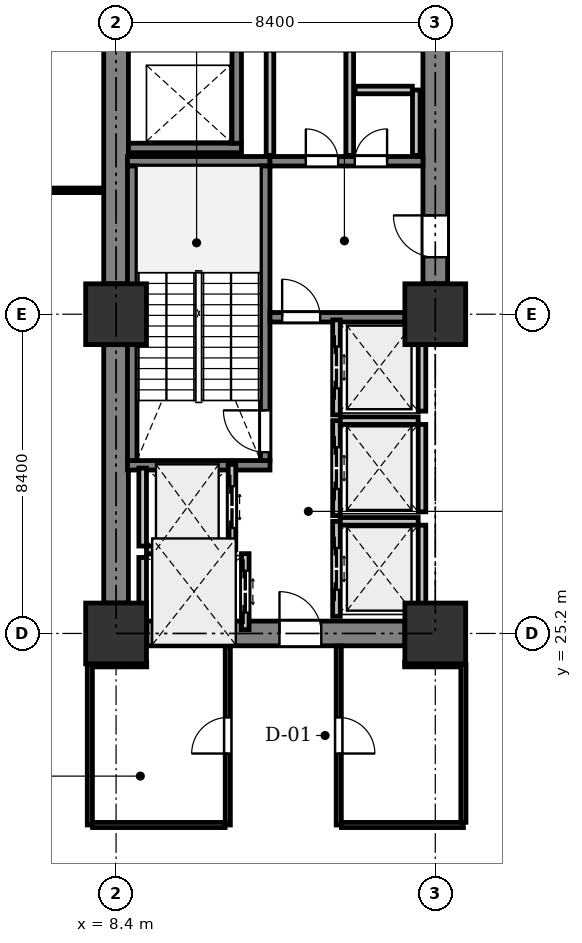
"""IFC4 building model, lengths in metres.
Left out: names, types, materials, properties, quantities, classifications, styles, units other than length and angle.
Written with IfcOpenShell. Run it as: python <this file> out.ifc"""

import sys

from ifc_helpers import new_model, si_unit, direction, frame, frame_2d, origin, origin_2d, place, context, subcontext, project, spatial, rectangle, extrude, element, fill, save


model = new_model("IFC4")
c1 = context("Model", 3, precision=1e-05, world=origin(), true_north=direction((0.0, 1.0)))
c2 = subcontext(c1, "Body", "Model", "MODEL_VIEW")
j1 = project(units=[si_unit("LENGTHUNIT", "METRE"), si_unit("PLANEANGLEUNIT", "RADIAN")], contexts=[c1])
p1 = place(None, origin())
s1 = spatial("IfcSite", under=j1, at=p1, CompositionType="ELEMENT")
p2 = place(p1, origin())
s2 = spatial("IfcBuilding", under=s1, at=p2, CompositionType="ELEMENT")
p3 = place(p2, frame((0.0, 0.0, 15.0)))
s3 = spatial("IfcBuildingStorey", under=s2, at=p3, CompositionType="ELEMENT", Elevation=15.0)
for number, where, z_axis, x_axis in (
    (1, (8.4, 25.2, 0.0), (0.0, 0.0, 1.0), (1.0, 0.0, 0.0)),
    (2, (8.4, 33.6, 0.0), (0.0, 0.0, 1.0), (1.0, 0.0, 0.0)),
    (3, (16.8, 25.2, 0.0), (0.0, 0.0, 1.0), (1.0, 0.0, 0.0)),
    (4, (16.8, 33.6, 0.0), (0.0, 0.0, 1.0), (1.0, 0.0, 0.0)),
):
    element("IfcColumn", number, at=place(p3, frame(where, z_axis=z_axis, x_axis=x_axis)), inside=s3, PredefinedType="COLUMN", context=c2, shape_type="SweptSolid", body=[
        extrude(rectangle(XDim=1.6, YDim=1.6, at=origin_2d()), origin(), (0.0, 0.0, 1.0), 4.8),
    ])
for number, where, z_axis, x_axis in (
    (5, (8.4, 26.0, 0.0), (0.0, 0.0, 1.0), (0.0, 1.0, 0.0)),
    (6, (8.4, 34.4, 0.0), (0.0, 0.0, 1.0), (0.0, 1.0, 0.0)),
):
    element("IfcWall", number, at=place(p3, frame(where, z_axis=z_axis, x_axis=x_axis)), inside=s3, PredefinedType="SHEAR", context=c2, shape_type="SweptSolid", body=[
        extrude(rectangle(XDim=6.8, YDim=0.65, at=frame_2d((3.4, 0.0))), origin(), (0.0, 0.0, 1.0), 4.45),
    ])
p4 = place(p3, frame((16.8, 34.4, 0.0), z_axis=(0.0, 0.0, 1.0), x_axis=(0.0, 1.0, 0.0)))
e7 = element("IfcWall", 7, at=p4, inside=s3, PredefinedType="SHEAR", context=c2, shape_type="SweptSolid", body=[
    extrude(rectangle(XDim=6.8, YDim=0.65, at=frame_2d((3.4, 0.0))), origin(), (0.0, 0.0, 1.0), 4.45),
])
p5 = place(p4, frame((0.7, 0.0, 0.0)))
e8 = element("IfcOpeningElement", 8, at=p5, cuts=e7, PredefinedType="OPENING", context=c2, shape_type="SweptSolid", body=[
    extrude(rectangle(XDim=1.1, YDim=2.15, at=frame_2d((0.55, 1.075))), frame((0.0, 0.335, 0.0), z_axis=(0.0, -1.0, 0.0), x_axis=(1.0, 0.0, 0.0)), (0.0, 0.0, 1.0), 0.67),
])
p6 = place(p3, frame((9.2, 25.2, 0.0), z_axis=(0.0, 0.0, 1.0), x_axis=(1.0, 0.0, 0.0)))
e9 = element("IfcWall", 9, at=p6, inside=s3, PredefinedType="SHEAR", context=c2, shape_type="SweptSolid", body=[
    extrude(rectangle(XDim=6.8, YDim=0.65, at=frame_2d((3.4, 0.0))), origin(), (0.0, 0.0, 1.0), 4.45),
])
p7 = place(p6, frame((3.5, 0.0, 0.0)))
e10 = element("IfcOpeningElement", 10, at=p7, cuts=e9, PredefinedType="OPENING", context=c2, shape_type="SweptSolid", body=[
    extrude(rectangle(XDim=1.1, YDim=2.15, at=frame_2d((0.55, 1.075))), frame((0.0, 0.335, 0.0), z_axis=(0.0, -1.0, 0.0), x_axis=(1.0, 0.0, 0.0)), (0.0, 0.0, 1.0), 0.67),
])
for number, where, z_axis, x_axis in (
    (11, (12.45, 29.625, 0.0), (0.0, 0.0, 1.0), (-1.0, 0.0, 0.0)),
    (12, (12.45, 37.625, 0.0), (0.0, 0.0, 1.0), (-1.0, 0.0, 0.0)),
):
    element("IfcWall", number, at=place(p3, frame(where, z_axis=z_axis, x_axis=x_axis)), inside=s3, PredefinedType="SHEAR", context=c2, shape_type="SweptSolid", body=[
        extrude(rectangle(XDim=3.75, YDim=0.25, at=frame_2d((1.875, 0.0))), origin(), (0.0, 0.0, 1.0), 4.45),
    ])
p8 = place(p3, frame((12.325, 29.75, 0.0), z_axis=(0.0, 0.0, 1.0), x_axis=(0.0, 1.0, 0.0)))
e13 = element("IfcWall", 13, at=p8, inside=s3, PredefinedType="SHEAR", context=c2, shape_type="SweptSolid", body=[
    extrude(rectangle(XDim=7.75, YDim=0.25, at=frame_2d((3.875, 0.0))), origin(), (0.0, 0.0, 1.0), 4.45),
])
p9 = place(p8, frame((0.22, 0.0, 0.0)))
e14 = element("IfcOpeningElement", 14, at=p9, cuts=e13, PredefinedType="OPENING", context=c2, shape_type="SweptSolid", body=[
    extrude(rectangle(XDim=1.1, YDim=2.15, at=frame_2d((0.55, 1.075))), frame((0.0, 0.135, 0.0), z_axis=(0.0, -1.0, 0.0), x_axis=(1.0, 0.0, 0.0)), (0.0, 0.0, 1.0), 0.27),
])
p10 = place(p3, frame((8.825, 29.75, 0.0), z_axis=(0.0, 0.0, 1.0), x_axis=(0.0, 1.0, 0.0)))
e15 = element("IfcWall", 15, at=p10, inside=s3, PredefinedType="SHEAR", context=c2, shape_type="SweptSolid", body=[
    extrude(rectangle(XDim=7.75, YDim=0.25, at=frame_2d((3.875, 0.0))), origin(), (0.0, 0.0, 1.0), 4.45),
])
p11 = place(p3, frame((8.725, 37.975, 0.0), z_axis=(0.0, 0.0, 1.0), x_axis=(1.0, 0.0, 0.0)))
e16 = element("IfcWall", 16, at=p11, inside=s3, PredefinedType="SHEAR", context=c2, shape_type="SweptSolid", body=[
    extrude(rectangle(XDim=2.975, YDim=0.25, at=frame_2d((1.487, 0.0))), origin(), (0.0, 0.0, 1.0), 4.45),
])
p12 = place(p3, frame((11.575, 38.1, 0.0), z_axis=(0.0, 0.0, 1.0), x_axis=(0.0, 1.0, 0.0)))
e17 = element("IfcWall", 17, at=p12, inside=s3, PredefinedType="SHEAR", context=c2, shape_type="SweptSolid", body=[
    extrude(rectangle(XDim=2.45, YDim=0.25, at=frame_2d((1.225, 0.0))), origin(), (0.0, 0.0, 1.0), 4.45),
])
p13 = place(p3, frame((12.45, 33.52, 0.0), z_axis=(0.0, 0.0, 1.0), x_axis=(1.0, 0.0, 0.0)))
e18 = element("IfcWall", 18, at=p13, inside=s3, PredefinedType="SHEAR", context=c2, shape_type="SweptSolid", body=[
    extrude(rectangle(XDim=3.55, YDim=0.25, at=frame_2d((1.775, 0.0))), origin(), (0.0, 0.0, 1.0), 4.45),
])
p14 = place(p13, frame((0.32, 0.0, 0.0)))
e19 = element("IfcOpeningElement", 19, at=p14, cuts=e18, PredefinedType="OPENING", context=c2, shape_type="SweptSolid", body=[
    extrude(rectangle(XDim=1.0, YDim=2.15, at=frame_2d((0.5, 1.075))), frame((0.0, 0.135, 0.0), z_axis=(0.0, -1.0, 0.0), x_axis=(1.0, 0.0, 0.0)), (0.0, 0.0, 1.0), 0.27),
])
p15 = place(p3, frame((12.45, 37.625, 0.0), z_axis=(0.0, 0.0, 1.0), x_axis=(1.0, 0.0, 0.0)))
e20 = element("IfcWall", 20, at=p15, inside=s3, PredefinedType="SHEAR", context=c2, shape_type="SweptSolid", body=[
    extrude(rectangle(XDim=4.025, YDim=0.25, at=frame_2d((2.013, 0.0))), origin(), (0.0, 0.0, 1.0), 4.45),
])
p16 = place(p15, frame((0.944, 0.0, 0.0)))
e21 = element("IfcOpeningElement", 21, at=p16, cuts=e20, PredefinedType="OPENING", context=c2, shape_type="SweptSolid", body=[
    extrude(rectangle(XDim=0.85, YDim=2.15, at=frame_2d((0.425, 1.075))), frame((0.0, 0.135, 0.0), z_axis=(0.0, -1.0, 0.0), x_axis=(1.0, 0.0, 0.0)), (0.0, 0.0, 1.0), 0.27),
])
p17 = place(p15, frame((2.231, 0.0, 0.0)))
e22 = element("IfcOpeningElement", 22, at=p17, cuts=e20, PredefinedType="OPENING", context=c2, shape_type="SweptSolid", body=[
    extrude(rectangle(XDim=0.85, YDim=2.15, at=frame_2d((0.425, 1.075))), frame((0.0, 0.135, 0.0), z_axis=(0.0, -1.0, 0.0), x_axis=(1.0, 0.0, 0.0)), (0.0, 0.0, 1.0), 0.27),
])
p18 = place(p3, frame((11.45, 27.4, 0.0), z_axis=(0.0, 0.0, 1.0), x_axis=(0.0, 1.0, 0.0)))
e23 = element("IfcWall", 23, at=p18, inside=s3, PredefinedType="PARTITIONING", context=c2, shape_type="SweptSolid", body=[
    extrude(rectangle(XDim=2.25, YDim=0.2, at=frame_2d((1.125, 0.0))), origin(), (0.0, 0.0, 1.0), 4.45),
])
p19 = place(p18, frame((0.575, 0.0, 0.0)))
e24 = element("IfcOpeningElement", 24, at=p19, cuts=e23, PredefinedType="OPENING", context=c2, shape_type="SweptSolid", body=[
    extrude(rectangle(XDim=1.1, YDim=2.2, at=frame_2d((0.55, 1.1))), frame((0.0, 0.11, 0.0), z_axis=(0.0, -1.0, 0.0), x_axis=(1.0, 0.0, 0.0)), (0.0, 0.0, 1.0), 0.22),
])
p20 = place(p3, frame((9.1, 27.5, 0.0), z_axis=(0.0, 0.0, 1.0), x_axis=(0.0, 1.0, 0.0)))
e25 = element("IfcWall", 25, at=p20, inside=s3, PredefinedType="PARTITIONING", context=c2, shape_type="SweptSolid", body=[
    extrude(rectangle(XDim=2.05, YDim=0.2, at=frame_2d((1.025, 0.0))), origin(), (0.0, 0.0, 1.0), 4.45),
])
p21 = place(p3, frame((9.2, 27.4, 0.0), z_axis=(0.0, 0.0, 1.0), x_axis=(1.0, 0.0, 0.0)))
e26 = element("IfcWall", 26, at=p21, inside=s3, PredefinedType="PARTITIONING", context=c2, shape_type="SweptSolid", body=[
    extrude(rectangle(XDim=2.15, YDim=0.2, at=frame_2d((1.075, 0.0))), origin(), (0.0, 0.0, 1.0), 4.45),
])
p22 = place(p3, frame((11.8, 25.3, 0.0), z_axis=(0.0, 0.0, 1.0), x_axis=(0.0, 1.0, 0.0)))
e27 = element("IfcWall", 27, at=p22, inside=s3, PredefinedType="PARTITIONING", context=c2, shape_type="SweptSolid", body=[
    extrude(rectangle(XDim=2.0, YDim=0.2, at=frame_2d((1.0, 0.0))), origin(), (0.0, 0.0, 1.0), 4.45),
])
p23 = place(p22, frame((0.45, 0.0, 0.0)))
e28 = element("IfcOpeningElement", 28, at=p23, cuts=e27, PredefinedType="OPENING", context=c2, shape_type="SweptSolid", body=[
    extrude(rectangle(XDim=1.1, YDim=2.2, at=frame_2d((0.55, 1.1))), frame((0.0, 0.11, 0.0), z_axis=(0.0, -1.0, 0.0), x_axis=(1.0, 0.0, 0.0)), (0.0, 0.0, 1.0), 0.22),
])
p24 = place(p3, frame((9.1, 25.4, 0.0), z_axis=(0.0, 0.0, 1.0), x_axis=(0.0, 1.0, 0.0)))
e29 = element("IfcWall", 29, at=p24, inside=s3, PredefinedType="PARTITIONING", context=c2, shape_type="SweptSolid", body=[
    extrude(rectangle(XDim=1.8, YDim=0.2, at=frame_2d((0.9, 0.0))), origin(), (0.0, 0.0, 1.0), 4.45),
])
p25 = place(p3, frame((14.2, 25.65, 0.0), z_axis=(0.0, 0.0, 1.0), x_axis=(0.0, 1.0, 0.0)))
e30 = element("IfcWall", 30, at=p25, inside=s3, PredefinedType="PARTITIONING", context=c2, shape_type="SweptSolid", body=[
    extrude(rectangle(XDim=2.5, YDim=0.2, at=frame_2d((1.25, 0.0))), origin(), (0.0, 0.0, 1.0), 4.45),
])
p26 = place(p25, frame((0.7, 0.0, 0.0)))
e31 = element("IfcOpeningElement", 31, at=p26, cuts=e30, PredefinedType="OPENING", context=c2, shape_type="SweptSolid", body=[
    extrude(rectangle(XDim=1.1, YDim=2.2, at=frame_2d((0.55, 1.1))), frame((0.0, 0.11, 0.0), z_axis=(0.0, -1.0, 0.0), x_axis=(1.0, 0.0, 0.0)), (0.0, 0.0, 1.0), 0.22),
])
p27 = place(p3, frame((16.45, 25.75, 0.0), z_axis=(0.0, 0.0, 1.0), x_axis=(0.0, 1.0, 0.0)))
e32 = element("IfcWall", 32, at=p27, inside=s3, PredefinedType="PARTITIONING", context=c2, shape_type="SweptSolid", body=[
    extrude(rectangle(XDim=2.3, YDim=0.2, at=frame_2d((1.15, 0.0))), origin(), (0.0, 0.0, 1.0), 4.45),
])
p28 = place(p3, frame((14.3, 28.15, 0.0), z_axis=(0.0, 0.0, 1.0), x_axis=(1.0, 0.0, 0.0)))
e33 = element("IfcWall", 33, at=p28, inside=s3, PredefinedType="PARTITIONING", context=c2, shape_type="SweptSolid", body=[
    extrude(rectangle(XDim=2.05, YDim=0.2, at=frame_2d((1.025, 0.0))), origin(), (0.0, 0.0, 1.0), 4.45),
])
p29 = place(p3, frame((14.2, 28.3, 0.0), z_axis=(0.0, 0.0, 1.0), x_axis=(0.0, 1.0, 0.0)))
e34 = element("IfcWall", 34, at=p29, inside=s3, PredefinedType="PARTITIONING", context=c2, shape_type="SweptSolid", body=[
    extrude(rectangle(XDim=2.5, YDim=0.2, at=frame_2d((1.25, 0.0))), origin(), (0.0, 0.0, 1.0), 4.45),
])
p30 = place(p29, frame((0.7, 0.0, 0.0)))
e35 = element("IfcOpeningElement", 35, at=p30, cuts=e34, PredefinedType="OPENING", context=c2, shape_type="SweptSolid", body=[
    extrude(rectangle(XDim=1.1, YDim=2.2, at=frame_2d((0.55, 1.1))), frame((0.0, 0.11, 0.0), z_axis=(0.0, -1.0, 0.0), x_axis=(1.0, 0.0, 0.0)), (0.0, 0.0, 1.0), 0.22),
])
p31 = place(p3, frame((16.45, 28.4, 0.0), z_axis=(0.0, 0.0, 1.0), x_axis=(0.0, 1.0, 0.0)))
e36 = element("IfcWall", 36, at=p31, inside=s3, PredefinedType="PARTITIONING", context=c2, shape_type="SweptSolid", body=[
    extrude(rectangle(XDim=2.3, YDim=0.2, at=frame_2d((1.15, 0.0))), origin(), (0.0, 0.0, 1.0), 4.45),
])
p32 = place(p3, frame((14.3, 30.8, 0.0), z_axis=(0.0, 0.0, 1.0), x_axis=(1.0, 0.0, 0.0)))
e37 = element("IfcWall", 37, at=p32, inside=s3, PredefinedType="PARTITIONING", context=c2, shape_type="SweptSolid", body=[
    extrude(rectangle(XDim=2.05, YDim=0.2, at=frame_2d((1.025, 0.0))), origin(), (0.0, 0.0, 1.0), 4.45),
])
p33 = place(p3, frame((14.2, 30.95, 0.0), z_axis=(0.0, 0.0, 1.0), x_axis=(0.0, 1.0, 0.0)))
e38 = element("IfcWall", 38, at=p33, inside=s3, PredefinedType="PARTITIONING", context=c2, shape_type="SweptSolid", body=[
    extrude(rectangle(XDim=2.5, YDim=0.2, at=frame_2d((1.25, 0.0))), origin(), (0.0, 0.0, 1.0), 4.45),
])
p34 = place(p33, frame((0.7, 0.0, 0.0)))
e39 = element("IfcOpeningElement", 39, at=p34, cuts=e38, PredefinedType="OPENING", context=c2, shape_type="SweptSolid", body=[
    extrude(rectangle(XDim=1.1, YDim=2.2, at=frame_2d((0.55, 1.1))), frame((0.0, 0.11, 0.0), z_axis=(0.0, -1.0, 0.0), x_axis=(1.0, 0.0, 0.0)), (0.0, 0.0, 1.0), 0.22),
])
p35 = place(p3, frame((16.45, 31.05, 0.0), z_axis=(0.0, 0.0, 1.0), x_axis=(0.0, 1.0, 0.0)))
e40 = element("IfcWall", 40, at=p35, inside=s3, PredefinedType="PARTITIONING", context=c2, shape_type="SweptSolid", body=[
    extrude(rectangle(XDim=2.3, YDim=0.2, at=frame_2d((1.15, 0.0))), origin(), (0.0, 0.0, 1.0), 4.45),
])
for number, where, z_axis, x_axis in (
    (41, (14.55, 37.78, 0.0), (0.0, 0.0, 1.0), (0.0, 1.0, 0.0)),
    (42, (12.45, 40.546, 0.0), (0.0, 0.0, 1.0), (0.0, -1.0, 0.0)),
):
    element("IfcWall", number, at=place(p3, frame(where, z_axis=z_axis, x_axis=x_axis)), inside=s3, PredefinedType="PARTITIONING", context=c2, shape_type="SweptSolid", body=[
        extrude(rectangle(XDim=2.766, YDim=0.2, at=frame_2d((1.383, 0.0))), origin(), (0.0, 0.0, 1.0), 3.35),
    ])
p36 = place(p3, frame((16.3, 37.78, 0.0), z_axis=(0.0, 0.0, 1.0), x_axis=(0.0, 1.0, 0.0)))
e43 = element("IfcWall", 43, at=p36, inside=s3, PredefinedType="PARTITIONING", context=c2, shape_type="SweptSolid", body=[
    extrude(rectangle(XDim=1.72, YDim=0.2, at=frame_2d((0.86, 0.0))), origin(), (0.0, 0.0, 1.0), 3.35),
])
p37 = place(p3, frame((16.196, 39.5, 0.0), z_axis=(0.0, 0.0, 1.0), x_axis=(-1.0, 0.0, 0.0)))
e44 = element("IfcWall", 44, at=p37, inside=s3, PredefinedType="PARTITIONING", context=c2, shape_type="SweptSolid", body=[
    extrude(rectangle(XDim=1.506, YDim=0.2, at=frame_2d((0.753, 0.0))), origin(), (0.0, 0.0, 1.0), 3.35),
])
p38 = place(p3, frame((17.54, 24.38, 0.0), z_axis=(0.0, 0.0, 1.0), x_axis=(-0.99999980047, 0.000631711813, 0.0)))
e45 = element("IfcWall", 45, at=p38, inside=s3, PredefinedType="PARTITIONING", context=c2, shape_type="SweptSolid", body=[
    extrude(rectangle(XDim=1.546, YDim=0.12, at=frame_2d((0.773, 0.0))), origin(), (0.0, 0.0, 1.0), 3.25),
])
p39 = place(p3, frame((14.26, 24.871, 0.0), z_axis=(0.0, 0.0, 1.0), x_axis=(0.0, -1.0, 0.0)))
e46 = element("IfcWall", 46, at=p39, inside=s3, PredefinedType="PARTITIONING", context=c2, shape_type="SweptSolid", body=[
    extrude(rectangle(XDim=4.711, YDim=0.135, at=frame_2d((2.355, 0.0))), origin(), (0.0, 0.0, 1.0), 4.45),
])
p40 = place(p39, frame((1.881, 0.0, 0.0)))
e47 = element("IfcOpeningElement", 47, at=p40, cuts=e46, PredefinedType="OPENING", context=c2, shape_type="SweptSolid", body=[
    extrude(rectangle(XDim=0.95, YDim=2.15, at=frame_2d((0.475, 1.075))), frame((0.0, 0.077, 0.0), z_axis=(0.0, -1.0, 0.0), x_axis=(1.0, 0.0, 0.0)), (0.0, 0.0, 1.0), 0.155),
])
p41 = place(p3, frame((14.332, 20.16, 0.0), z_axis=(0.0, 0.0, 1.0), x_axis=(1.0, 0.0, 0.0)))
e48 = element("IfcWall", 48, at=p41, inside=s3, PredefinedType="PARTITIONING", context=c2, shape_type="SweptSolid", body=[
    extrude(rectangle(XDim=3.208, YDim=0.135, at=frame_2d((1.604, 0.0))), origin(), (0.0, 0.0, 1.0), 3.25),
])
p42 = place(p3, frame((17.54, 20.231, 0.0), z_axis=(0.0, 0.0, 1.0), x_axis=(0.0, 1.0, 0.0)))
e49 = element("IfcWall", 49, at=p42, inside=s3, PredefinedType="PARTITIONING", context=c2, shape_type="SweptSolid", body=[
    extrude(rectangle(XDim=4.148, YDim=0.135, at=frame_2d((2.074, 0.0))), origin(), (0.0, 0.0, 1.0), 4.45),
])
p43 = place(p3, frame((11.34, 20.16, 0.0), z_axis=(0.0, 0.0, 1.0), x_axis=(0.0, 1.0, 0.0)))
e50 = element("IfcWall", 50, at=p43, inside=s3, PredefinedType="PARTITIONING", context=c2, shape_type="SweptSolid", body=[
    extrude(rectangle(XDim=4.711, YDim=0.135, at=frame_2d((2.355, 0.0))), origin(), (0.0, 0.0, 1.0), 4.45),
])
p44 = place(p43, frame((1.881, 0.0, 0.0)))
e51 = element("IfcOpeningElement", 51, at=p44, cuts=e50, PredefinedType="OPENING", context=c2, shape_type="SweptSolid", body=[
    extrude(rectangle(XDim=0.95, YDim=2.15, at=frame_2d((0.475, 1.075))), frame((0.0, 0.077, 0.0), z_axis=(0.0, -1.0, 0.0), x_axis=(1.0, 0.0, 0.0)), (0.0, 0.0, 1.0), 0.155),
])
p45 = place(p3, frame((9.206, 24.381, 0.0), z_axis=(0.0, 0.0, 1.0), x_axis=(-0.999999786895, -0.00065284791, 0.0)))
e52 = element("IfcWall", 52, at=p45, inside=s3, PredefinedType="PARTITIONING", context=c2, shape_type="SweptSolid", body=[
    extrude(rectangle(XDim=1.496, YDim=0.12, at=frame_2d((0.748, 0.0))), origin(), (0.0, 0.0, 1.0), 3.25),
])
p46 = place(p3, frame((7.71, 24.38, 0.0), z_axis=(0.0, 0.0, 1.0), x_axis=(0.0, -1.0, 0.0)))
e53 = element("IfcWall", 53, at=p46, inside=s3, PredefinedType="PARTITIONING", context=c2, shape_type="SweptSolid", body=[
    extrude(rectangle(XDim=4.22, YDim=0.135, at=frame_2d((2.11, 0.0))), origin(), (0.0, 0.0, 1.0), 4.45),
])
p47 = place(p3, frame((7.781, 20.16, 0.0), z_axis=(0.0, 0.0, 1.0), x_axis=(1.0, 0.0, 0.0)))
e54 = element("IfcWall", 54, at=p47, inside=s3, PredefinedType="PARTITIONING", context=c2, shape_type="SweptSolid", body=[
    extrude(rectangle(XDim=3.487, YDim=0.135, at=frame_2d((1.744, 0.0))), origin(), (0.0, 0.0, 1.0), 3.25),
])
p48 = place(p3, frame((5.4, 36.86, 0.0), z_axis=(0.0, 0.0, 1.0), x_axis=(1.0, 0.0, 0.0)))
e55 = element("IfcWall", 55, at=p48, inside=s3, PredefinedType="PARTITIONING", context=c2, shape_type="SweptSolid", body=[
    extrude(rectangle(XDim=2.671, YDim=0.12, at=frame_2d((1.335, 0.0))), origin(), (0.0, 0.0, 1.0), 4.45),
])
p49 = place(p5, origin())
e56 = element("IfcDoor", 56, at=p49, inside=s3, OperationType="SINGLE_SWING_RIGHT", PredefinedType="DOOR", context=c2, shape_type="SweptSolid", body=[
    extrude(rectangle(XDim=1.1, YDim=2.15, at=frame_2d((0.55, 1.075))), frame((0.0, 0.025, 0.0), z_axis=(0.0, -1.0, 0.0), x_axis=(1.0, 0.0, 0.0)), (0.0, 0.0, 1.0), 0.05),
])
fill(e8, e56)
p50 = place(p7, origin())
e57 = element("IfcDoor", 57, at=p50, inside=s3, OperationType="SINGLE_SWING_LEFT", PredefinedType="DOOR", context=c2, shape_type="SweptSolid", body=[
    extrude(rectangle(XDim=1.1, YDim=2.15, at=frame_2d((0.55, 1.075))), frame((0.0, 0.025, 0.0), z_axis=(0.0, -1.0, 0.0), x_axis=(1.0, 0.0, 0.0)), (0.0, 0.0, 1.0), 0.05),
])
fill(e10, e57)
p51 = place(p9, origin())
e58 = element("IfcDoor", 58, at=p51, inside=s3, OperationType="SINGLE_SWING_RIGHT", PredefinedType="DOOR", context=c2, shape_type="SweptSolid", body=[
    extrude(rectangle(XDim=1.1, YDim=2.15, at=frame_2d((0.55, 1.075))), frame((0.0, 0.025, 0.0), z_axis=(0.0, -1.0, 0.0), x_axis=(1.0, 0.0, 0.0)), (0.0, 0.0, 1.0), 0.05),
])
fill(e14, e58)
p52 = place(p14, origin())
e59 = element("IfcDoor", 59, at=p52, inside=s3, OperationType="SINGLE_SWING_LEFT", PredefinedType="DOOR", context=c2, shape_type="SweptSolid", body=[
    extrude(rectangle(XDim=1.0, YDim=2.15, at=frame_2d((0.5, 1.075))), frame((0.0, 0.025, 0.0), z_axis=(0.0, -1.0, 0.0), x_axis=(1.0, 0.0, 0.0)), (0.0, 0.0, 1.0), 0.05),
])
fill(e19, e59)
p53 = place(p19, origin())
e60 = element("IfcDoor", 60, at=p53, inside=s3, OperationType="DOUBLE_DOOR_SLIDING", PredefinedType="DOOR", context=c2, shape_type="SweptSolid", body=[
    extrude(rectangle(XDim=1.1, YDim=2.2, at=frame_2d((0.55, 1.1))), frame((0.0, 0.025, 0.0), z_axis=(0.0, -1.0, 0.0), x_axis=(1.0, 0.0, 0.0)), (0.0, 0.0, 1.0), 0.05),
])
fill(e24, e60)
p54 = place(p23, origin())
e61 = element("IfcDoor", 61, at=p54, inside=s3, OperationType="DOUBLE_DOOR_SLIDING", PredefinedType="DOOR", context=c2, shape_type="SweptSolid", body=[
    extrude(rectangle(XDim=1.1, YDim=2.2, at=frame_2d((0.55, 1.1))), frame((0.0, 0.025, 0.0), z_axis=(0.0, -1.0, 0.0), x_axis=(1.0, 0.0, 0.0)), (0.0, 0.0, 1.0), 0.05),
])
fill(e28, e61)
p55 = place(p26, origin())
e62 = element("IfcDoor", 62, at=p55, inside=s3, OperationType="DOUBLE_DOOR_SLIDING", PredefinedType="DOOR", context=c2, shape_type="SweptSolid", body=[
    extrude(rectangle(XDim=1.1, YDim=2.2, at=frame_2d((0.55, 1.1))), frame((0.0, 0.025, 0.0), z_axis=(0.0, -1.0, 0.0), x_axis=(1.0, 0.0, 0.0)), (0.0, 0.0, 1.0), 0.05),
])
fill(e31, e62)
p56 = place(p30, origin())
e63 = element("IfcDoor", 63, at=p56, inside=s3, OperationType="DOUBLE_DOOR_SLIDING", PredefinedType="DOOR", context=c2, shape_type="SweptSolid", body=[
    extrude(rectangle(XDim=1.1, YDim=2.2, at=frame_2d((0.55, 1.1))), frame((0.0, 0.025, 0.0), z_axis=(0.0, -1.0, 0.0), x_axis=(1.0, 0.0, 0.0)), (0.0, 0.0, 1.0), 0.05),
])
fill(e35, e63)
p57 = place(p34, origin())
e64 = element("IfcDoor", 64, at=p57, inside=s3, OperationType="DOUBLE_DOOR_SLIDING", PredefinedType="DOOR", context=c2, shape_type="SweptSolid", body=[
    extrude(rectangle(XDim=1.1, YDim=2.2, at=frame_2d((0.55, 1.1))), frame((0.0, 0.025, 0.0), z_axis=(0.0, -1.0, 0.0), x_axis=(1.0, 0.0, 0.0)), (0.0, 0.0, 1.0), 0.05),
])
fill(e39, e64)
p58 = place(p16, origin())
e65 = element("IfcDoor", 65, at=p58, inside=s3, OperationType="SINGLE_SWING_LEFT", PredefinedType="DOOR", context=c2, shape_type="SweptSolid", body=[
    extrude(rectangle(XDim=0.85, YDim=2.15, at=frame_2d((0.425, 1.075))), frame((0.0, 0.025, 0.0), z_axis=(0.0, -1.0, 0.0), x_axis=(1.0, 0.0, 0.0)), (0.0, 0.0, 1.0), 0.05),
])
fill(e21, e65)
p59 = place(p17, origin())
e66 = element("IfcDoor", 66, at=p59, inside=s3, OperationType="SINGLE_SWING_RIGHT", PredefinedType="DOOR", context=c2, shape_type="SweptSolid", body=[
    extrude(rectangle(XDim=0.85, YDim=2.15, at=frame_2d((0.425, 1.075))), frame((0.0, 0.025, 0.0), z_axis=(0.0, -1.0, 0.0), x_axis=(1.0, 0.0, 0.0)), (0.0, 0.0, 1.0), 0.05),
])
fill(e22, e66)
p60 = place(p40, origin())
e67 = element("IfcDoor", 67, at=p60, inside=s3, OperationType="SINGLE_SWING_RIGHT", PredefinedType="DOOR", context=c2, shape_type="SweptSolid", body=[
    extrude(rectangle(XDim=0.95, YDim=2.15, at=frame_2d((0.475, 1.075))), frame((0.0, 0.025, 0.0), z_axis=(0.0, -1.0, 0.0), x_axis=(1.0, 0.0, 0.0)), (0.0, 0.0, 1.0), 0.05),
])
fill(e47, e67)
p61 = place(p44, origin())
e68 = element("IfcDoor", 68, at=p61, inside=s3, OperationType="SINGLE_SWING_LEFT", PredefinedType="DOOR", context=c2, shape_type="SweptSolid", body=[
    extrude(rectangle(XDim=0.95, YDim=2.15, at=frame_2d((0.475, 1.075))), frame((0.0, 0.025, 0.0), z_axis=(0.0, -1.0, 0.0), x_axis=(1.0, 0.0, 0.0)), (0.0, 0.0, 1.0), 0.05),
])
fill(e51, e68)
save(model, sys.argv[1])
